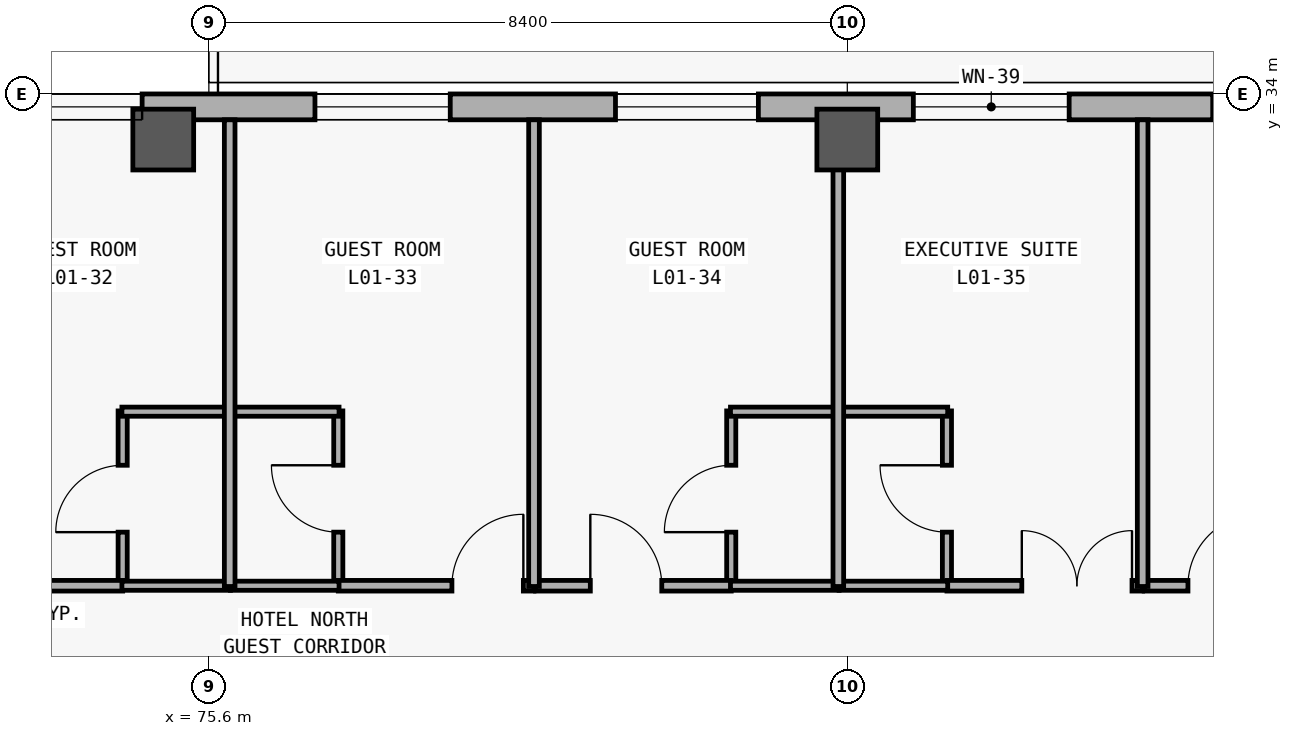
"""IFC4 building model, lengths in metres.
Left out: names, types, materials, properties, quantities, classifications, styles, units other than length and angle.
Written with IfcOpenShell. Run it as: python <this file> out.ifc"""

import sys

from ifc_helpers import new_model, si_unit, direction, frame, frame_2d, origin, origin_2d, place, context, subcontext, project, spatial, rectangle, extrude, element, fill, save


model = new_model("IFC4")
c1 = context("Model", 3, precision=1e-05, world=origin(), true_north=direction((0.0, 1.0)))
c2 = subcontext(c1, "Body", "Model", "MODEL_VIEW")
j1 = project(units=[si_unit("LENGTHUNIT", "METRE"), si_unit("PLANEANGLEUNIT", "RADIAN")], contexts=[c1])
p1 = place(None, origin())
s1 = spatial("IfcSite", under=j1, at=p1, CompositionType="ELEMENT")
p2 = place(p1, origin())
s2 = spatial("IfcBuilding", under=s1, at=p2, CompositionType="ELEMENT")
p3 = place(p2, frame((0.0, 0.0, 5.4)))
s3 = spatial("IfcBuildingStorey", under=s2, at=p3, CompositionType="ELEMENT", Elevation=5.4)
for number, where, z_axis, x_axis in (
    (1, (75.0, 33.4, 0.0), (0.0, 0.0, 1.0), (1.0, 0.0, 0.0)),
    (2, (84.0, 33.4, 0.0), (0.0, 0.0, 1.0), (1.0, 0.0, 0.0)),
):
    element("IfcColumn", number, at=place(p3, frame(where, z_axis=z_axis, x_axis=x_axis)), inside=s3, PredefinedType="COLUMN", context=c2, shape_type="SweptSolid", body=[
        extrude(rectangle(XDim=0.8, YDim=0.8, at=origin_2d()), origin(), (0.0, 0.0, 1.0), 5.4),
    ])
p4 = place(p3, frame((8.74, 33.83, 0.0), z_axis=(0.0, 0.0, 1.0), x_axis=(1.0, 0.0, 0.0)))
e3 = element("IfcWall", 3, at=p4, inside=s3, PredefinedType="SOLIDWALL", context=c2, shape_type="SweptSolid", body=[
    extrude(rectangle(XDim=83.32, YDim=0.34, at=frame_2d((41.66, 0.0))), origin(), (0.0, 0.0, 1.0), 5.1),
])
p5 = place(p4, frame((4.795, 0.0, 0.85)))
e4 = element("IfcOpeningElement", 4, at=p5, cuts=e3, PredefinedType="OPENING", context=c2, shape_type="SweptSolid", body=[
    extrude(rectangle(XDim=1.58, YDim=1.85, at=frame_2d((0.79, 0.925))), frame((0.0, 0.18, 0.0), z_axis=(0.0, -1.0, 0.0), x_axis=(1.0, 0.0, 0.0)), (0.0, 0.0, 1.0), 0.36),
])
p6 = place(p4, frame((11.542, 0.0, 0.85)))
e5 = element("IfcOpeningElement", 5, at=p6, cuts=e3, PredefinedType="OPENING", context=c2, shape_type="SweptSolid", body=[
    extrude(rectangle(XDim=3.1, YDim=2.2, at=frame_2d((1.55, 1.1))), frame((0.0, 0.18, 0.0), z_axis=(0.0, -1.0, 0.0), x_axis=(1.0, 0.0, 0.0)), (0.0, 0.0, 1.0), 0.36),
])
p7 = place(p4, frame((16.471, 0.0, 0.85)))
e6 = element("IfcOpeningElement", 6, at=p7, cuts=e3, PredefinedType="OPENING", context=c2, shape_type="SweptSolid", body=[
    extrude(rectangle(XDim=1.25, YDim=1.45, at=frame_2d((0.625, 0.725))), frame((0.0, 0.18, 0.0), z_axis=(0.0, -1.0, 0.0), x_axis=(1.0, 0.0, 0.0)), (0.0, 0.0, 1.0), 0.36),
])
p8 = place(p4, frame((20.425, 0.0, 0.85)))
e7 = element("IfcOpeningElement", 7, at=p8, cuts=e3, PredefinedType="OPENING", context=c2, shape_type="SweptSolid", body=[
    extrude(rectangle(XDim=1.35, YDim=1.55, at=frame_2d((0.675, 0.775))), frame((0.0, 0.18, 0.0), z_axis=(0.0, -1.0, 0.0), x_axis=(1.0, 0.0, 0.0)), (0.0, 0.0, 1.0), 0.36),
])
p9 = place(p4, frame((24.379, 0.0, 0.85)))
e8 = element("IfcOpeningElement", 8, at=p9, cuts=e3, PredefinedType="OPENING", context=c2, shape_type="SweptSolid", body=[
    extrude(rectangle(XDim=1.45, YDim=1.65, at=frame_2d((0.725, 0.825))), frame((0.0, 0.18, 0.0), z_axis=(0.0, -1.0, 0.0), x_axis=(1.0, 0.0, 0.0)), (0.0, 0.0, 1.0), 0.36),
])
p10 = place(p4, frame((28.332, 0.0, 0.85)))
e9 = element("IfcOpeningElement", 9, at=p10, cuts=e3, PredefinedType="OPENING", context=c2, shape_type="SweptSolid", body=[
    extrude(rectangle(XDim=1.55, YDim=1.65, at=frame_2d((0.775, 0.825))), frame((0.0, 0.18, 0.0), z_axis=(0.0, -1.0, 0.0), x_axis=(1.0, 0.0, 0.0)), (0.0, 0.0, 1.0), 0.36),
])
p11 = place(p4, frame((32.261, 0.0, 0.85)))
e10 = element("IfcOpeningElement", 10, at=p11, cuts=e3, PredefinedType="OPENING", context=c2, shape_type="SweptSolid", body=[
    extrude(rectangle(XDim=1.7, YDim=2.0, at=frame_2d((0.85, 1.0))), frame((0.0, 0.18, 0.0), z_axis=(0.0, -1.0, 0.0), x_axis=(1.0, 0.0, 0.0)), (0.0, 0.0, 1.0), 0.36),
])
p12 = place(p4, frame((35.965, 0.0, 0.85)))
e11 = element("IfcOpeningElement", 11, at=p12, cuts=e3, PredefinedType="OPENING", context=c2, shape_type="SweptSolid", body=[
    extrude(rectangle(XDim=2.3, YDim=2.05, at=frame_2d((1.15, 1.025))), frame((0.0, 0.18, 0.0), z_axis=(0.0, -1.0, 0.0), x_axis=(1.0, 0.0, 0.0)), (0.0, 0.0, 1.0), 0.36),
])
p13 = place(p4, frame((39.744, 0.0, 0.85)))
e12 = element("IfcOpeningElement", 12, at=p13, cuts=e3, PredefinedType="OPENING", context=c2, shape_type="SweptSolid", body=[
    extrude(rectangle(XDim=2.75, YDim=2.1, at=frame_2d((1.375, 1.05))), frame((0.0, 0.18, 0.0), z_axis=(0.0, -1.0, 0.0), x_axis=(1.0, 0.0, 0.0)), (0.0, 0.0, 1.0), 0.36),
])
p14 = place(p4, frame((44.533, 0.0, 0.85)))
e13 = element("IfcOpeningElement", 13, at=p14, cuts=e3, PredefinedType="OPENING", context=c2, shape_type="SweptSolid", body=[
    extrude(rectangle(XDim=1.18, YDim=1.5, at=frame_2d((0.59, 0.75))), frame((0.0, 0.18, 0.0), z_axis=(0.0, -1.0, 0.0), x_axis=(1.0, 0.0, 0.0)), (0.0, 0.0, 1.0), 0.36),
])
p15 = place(p4, frame((48.487, 0.0, 0.85)))
e14 = element("IfcOpeningElement", 14, at=p15, cuts=e3, PredefinedType="OPENING", context=c2, shape_type="SweptSolid", body=[
    extrude(rectangle(XDim=1.28, YDim=1.6, at=frame_2d((0.64, 0.8))), frame((0.0, 0.18, 0.0), z_axis=(0.0, -1.0, 0.0), x_axis=(1.0, 0.0, 0.0)), (0.0, 0.0, 1.0), 0.36),
])
p16 = place(p4, frame((52.441, 0.0, 0.85)))
e15 = element("IfcOpeningElement", 15, at=p16, cuts=e3, PredefinedType="OPENING", context=c2, shape_type="SweptSolid", body=[
    extrude(rectangle(XDim=1.38, YDim=1.7, at=frame_2d((0.69, 0.85))), frame((0.0, 0.18, 0.0), z_axis=(0.0, -1.0, 0.0), x_axis=(1.0, 0.0, 0.0)), (0.0, 0.0, 1.0), 0.36),
])
p17 = place(p4, frame((56.395, 0.0, 0.85)))
e16 = element("IfcOpeningElement", 16, at=p17, cuts=e3, PredefinedType="OPENING", context=c2, shape_type="SweptSolid", body=[
    extrude(rectangle(XDim=1.48, YDim=1.8, at=frame_2d((0.74, 0.9))), frame((0.0, 0.18, 0.0), z_axis=(0.0, -1.0, 0.0), x_axis=(1.0, 0.0, 0.0)), (0.0, 0.0, 1.0), 0.36),
])
p18 = place(p4, frame((60.349, 0.0, 0.85)))
e17 = element("IfcOpeningElement", 17, at=p18, cuts=e3, PredefinedType="OPENING", context=c2, shape_type="SweptSolid", body=[
    extrude(rectangle(XDim=1.58, YDim=1.85, at=frame_2d((0.79, 0.925))), frame((0.0, 0.18, 0.0), z_axis=(0.0, -1.0, 0.0), x_axis=(1.0, 0.0, 0.0)), (0.0, 0.0, 1.0), 0.36),
])
p19 = place(p4, frame((64.302, 0.0, 0.85)))
e18 = element("IfcOpeningElement", 18, at=p19, cuts=e3, PredefinedType="OPENING", context=c2, shape_type="SweptSolid", body=[
    extrude(rectangle(XDim=1.68, YDim=1.9, at=frame_2d((0.84, 0.95))), frame((0.0, 0.18, 0.0), z_axis=(0.0, -1.0, 0.0), x_axis=(1.0, 0.0, 0.0)), (0.0, 0.0, 1.0), 0.36),
])
p20 = place(p4, frame((68.256, 0.0, 0.85)))
e19 = element("IfcOpeningElement", 19, at=p20, cuts=e3, PredefinedType="OPENING", context=c2, shape_type="SweptSolid", body=[
    extrude(rectangle(XDim=1.78, YDim=1.95, at=frame_2d((0.89, 0.975))), frame((0.0, 0.18, 0.0), z_axis=(0.0, -1.0, 0.0), x_axis=(1.0, 0.0, 0.0)), (0.0, 0.0, 1.0), 0.36),
])
p21 = place(p4, frame((72.21, 0.0, 0.85)))
e20 = element("IfcOpeningElement", 20, at=p21, cuts=e3, PredefinedType="OPENING", context=c2, shape_type="SweptSolid", body=[
    extrude(rectangle(XDim=1.88, YDim=1.95, at=frame_2d((0.94, 0.975))), frame((0.0, 0.18, 0.0), z_axis=(0.0, -1.0, 0.0), x_axis=(1.0, 0.0, 0.0)), (0.0, 0.0, 1.0), 0.36),
])
p22 = place(p4, frame((76.129, 0.0, 0.85)))
e21 = element("IfcOpeningElement", 21, at=p22, cuts=e3, PredefinedType="OPENING", context=c2, shape_type="SweptSolid", body=[
    extrude(rectangle(XDim=2.05, YDim=1.95, at=frame_2d((1.025, 0.975))), frame((0.0, 0.18, 0.0), z_axis=(0.0, -1.0, 0.0), x_axis=(1.0, 0.0, 0.0)), (0.0, 0.0, 1.0), 0.36),
])
p23 = place(p4, frame((80.068, 0.0, 0.85)))
e22 = element("IfcOpeningElement", 22, at=p23, cuts=e3, PredefinedType="OPENING", context=c2, shape_type="SweptSolid", body=[
    extrude(rectangle(XDim=2.18, YDim=1.95, at=frame_2d((1.09, 0.975))), frame((0.0, 0.18, 0.0), z_axis=(0.0, -1.0, 0.0), x_axis=(1.0, 0.0, 0.0)), (0.0, 0.0, 1.0), 0.36),
])
p24 = place(p3, frame((74.466, 27.52, 0.0), z_axis=(0.0, 0.0, 1.0), x_axis=(0.0, 1.0, 0.0)))
e23 = element("IfcWall", 23, at=p24, inside=s3, PredefinedType="PARTITIONING", context=c2, shape_type="SweptSolid", body=[
    extrude(rectangle(XDim=2.31, YDim=0.12, at=frame_2d((1.155, 0.0))), origin(), (0.0, 0.0, 1.0), 4.18),
])
p25 = place(p24, frame((0.715, 0.0, 0.0)))
e24 = element("IfcOpeningElement", 24, at=p25, cuts=e23, PredefinedType="OPENING", context=c2, shape_type="SweptSolid", body=[
    extrude(rectangle(XDim=0.88, YDim=2.15, at=frame_2d((0.44, 1.075))), frame((0.0, 0.07, 0.0), z_axis=(0.0, -1.0, 0.0), x_axis=(1.0, 0.0, 0.0)), (0.0, 0.0, 1.0), 0.14),
])
p26 = place(p3, frame((77.303, 27.52, 0.0), z_axis=(0.0, 0.0, 1.0), x_axis=(0.0, 1.0, 0.0)))
e25 = element("IfcWall", 25, at=p26, inside=s3, PredefinedType="PARTITIONING", context=c2, shape_type="SweptSolid", body=[
    extrude(rectangle(XDim=2.31, YDim=0.12, at=frame_2d((1.155, 0.0))), origin(), (0.0, 0.0, 1.0), 4.18),
])
p27 = place(p26, frame((0.715, 0.0, 0.0)))
e26 = element("IfcOpeningElement", 26, at=p27, cuts=e25, PredefinedType="OPENING", context=c2, shape_type="SweptSolid", body=[
    extrude(rectangle(XDim=0.88, YDim=2.15, at=frame_2d((0.44, 1.075))), frame((0.0, 0.07, 0.0), z_axis=(0.0, -1.0, 0.0), x_axis=(1.0, 0.0, 0.0)), (0.0, 0.0, 1.0), 0.14),
])
p28 = place(p3, frame((82.473, 27.52, 0.0), z_axis=(0.0, 0.0, 1.0), x_axis=(0.0, 1.0, 0.0)))
e27 = element("IfcWall", 27, at=p28, inside=s3, PredefinedType="PARTITIONING", context=c2, shape_type="SweptSolid", body=[
    extrude(rectangle(XDim=2.31, YDim=0.12, at=frame_2d((1.155, 0.0))), origin(), (0.0, 0.0, 1.0), 4.18),
])
p29 = place(p28, frame((0.715, 0.0, 0.0)))
e28 = element("IfcOpeningElement", 28, at=p29, cuts=e27, PredefinedType="OPENING", context=c2, shape_type="SweptSolid", body=[
    extrude(rectangle(XDim=0.88, YDim=2.15, at=frame_2d((0.44, 1.075))), frame((0.0, 0.07, 0.0), z_axis=(0.0, -1.0, 0.0), x_axis=(1.0, 0.0, 0.0)), (0.0, 0.0, 1.0), 0.14),
])
p30 = place(p3, frame((85.311, 27.52, 0.0), z_axis=(0.0, 0.0, 1.0), x_axis=(0.0, 1.0, 0.0)))
e29 = element("IfcWall", 29, at=p30, inside=s3, PredefinedType="PARTITIONING", context=c2, shape_type="SweptSolid", body=[
    extrude(rectangle(XDim=2.31, YDim=0.12, at=frame_2d((1.155, 0.0))), origin(), (0.0, 0.0, 1.0), 4.18),
])
p31 = place(p30, frame((0.715, 0.0, 0.0)))
e30 = element("IfcOpeningElement", 30, at=p31, cuts=e29, PredefinedType="OPENING", context=c2, shape_type="SweptSolid", body=[
    extrude(rectangle(XDim=0.88, YDim=2.15, at=frame_2d((0.44, 1.075))), frame((0.0, 0.07, 0.0), z_axis=(0.0, -1.0, 0.0), x_axis=(1.0, 0.0, 0.0)), (0.0, 0.0, 1.0), 0.14),
])
p32 = place(p3, frame((71.891, 27.53, 0.0), z_axis=(0.0, 0.0, 1.0), x_axis=(1.0, 0.0, 0.0)))
e31 = element("IfcWall", 31, at=p32, inside=s3, PredefinedType="PARTITIONING", context=c2, shape_type="SweptSolid", body=[
    extrude(rectangle(XDim=2.575, YDim=0.14, at=frame_2d((1.288, 0.0))), origin(), (0.0, 0.0, 1.0), 4.18),
])
p33 = place(p32, frame((0.576, 0.0, 0.0)))
e32 = element("IfcOpeningElement", 32, at=p33, cuts=e31, PredefinedType="OPENING", context=c2, shape_type="SweptSolid", body=[
    extrude(rectangle(XDim=0.94, YDim=2.2, at=frame_2d((0.47, 1.1))), frame((0.0, 0.08, 0.0), z_axis=(0.0, -1.0, 0.0), x_axis=(1.0, 0.0, 0.0)), (0.0, 0.0, 1.0), 0.16),
])
p34 = place(p3, frame((77.303, 27.53, 0.0), z_axis=(0.0, 0.0, 1.0), x_axis=(1.0, 0.0, 0.0)))
e33 = element("IfcWall", 33, at=p34, inside=s3, PredefinedType="PARTITIONING", context=c2, shape_type="SweptSolid", body=[
    extrude(rectangle(XDim=2.575, YDim=0.14, at=frame_2d((1.288, 0.0))), origin(), (0.0, 0.0, 1.0), 4.18),
])
p35 = place(p34, frame((1.495, 0.0, 0.0)))
e34 = element("IfcOpeningElement", 34, at=p35, cuts=e33, PredefinedType="OPENING", context=c2, shape_type="SweptSolid", body=[
    extrude(rectangle(XDim=0.94, YDim=2.2, at=frame_2d((0.47, 1.1))), frame((0.0, 0.08, 0.0), z_axis=(0.0, -1.0, 0.0), x_axis=(1.0, 0.0, 0.0)), (0.0, 0.0, 1.0), 0.16),
])
p36 = place(p3, frame((79.898, 27.53, 0.0), z_axis=(0.0, 0.0, 1.0), x_axis=(1.0, 0.0, 0.0)))
e35 = element("IfcWall", 35, at=p36, inside=s3, PredefinedType="PARTITIONING", context=c2, shape_type="SweptSolid", body=[
    extrude(rectangle(XDim=2.575, YDim=0.14, at=frame_2d((1.288, 0.0))), origin(), (0.0, 0.0, 1.0), 4.18),
])
p37 = place(p36, frame((0.721, 0.0, 0.0)))
e36 = element("IfcOpeningElement", 36, at=p37, cuts=e35, PredefinedType="OPENING", context=c2, shape_type="SweptSolid", body=[
    extrude(rectangle(XDim=0.94, YDim=2.2, at=frame_2d((0.47, 1.1))), frame((0.0, 0.08, 0.0), z_axis=(0.0, -1.0, 0.0), x_axis=(1.0, 0.0, 0.0)), (0.0, 0.0, 1.0), 0.16),
])
p38 = place(p3, frame((85.311, 27.53, 0.0), z_axis=(0.0, 0.0, 1.0), x_axis=(1.0, 0.0, 0.0)))
e37 = element("IfcWall", 37, at=p38, inside=s3, PredefinedType="PARTITIONING", context=c2, shape_type="SweptSolid", body=[
    extrude(rectangle(XDim=2.575, YDim=0.14, at=frame_2d((1.288, 0.0))), origin(), (0.0, 0.0, 1.0), 4.18),
])
p39 = place(p38, frame((0.985, 0.0, 0.0)))
e38 = element("IfcOpeningElement", 38, at=p39, cuts=e37, PredefinedType="OPENING", context=c2, shape_type="SweptSolid", body=[
    extrude(rectangle(XDim=1.45, YDim=2.3, at=frame_2d((0.725, 1.15))), frame((0.0, 0.08, 0.0), z_axis=(0.0, -1.0, 0.0), x_axis=(1.0, 0.0, 0.0)), (0.0, 0.0, 1.0), 0.16),
])
p40 = place(p3, frame((87.906, 27.53, 0.0), z_axis=(0.0, 0.0, 1.0), x_axis=(1.0, 0.0, 0.0)))
e39 = element("IfcWall", 39, at=p40, inside=s3, PredefinedType="PARTITIONING", context=c2, shape_type="SweptSolid", body=[
    extrude(rectangle(XDim=2.575, YDim=0.14, at=frame_2d((1.288, 0.0))), origin(), (0.0, 0.0, 1.0), 4.18),
])
p41 = place(p40, frame((0.576, 0.0, 0.0)))
e40 = element("IfcOpeningElement", 40, at=p41, cuts=e39, PredefinedType="OPENING", context=c2, shape_type="SweptSolid", body=[
    extrude(rectangle(XDim=0.94, YDim=2.2, at=frame_2d((0.47, 1.1))), frame((0.0, 0.08, 0.0), z_axis=(0.0, -1.0, 0.0), x_axis=(1.0, 0.0, 0.0)), (0.0, 0.0, 1.0), 0.16),
])
for number, where, z_axis, x_axis in (
    (41, (74.456, 27.53, 0.0), (0.0, 0.0, 1.0), (1.0, 0.0, 0.0)),
    (42, (74.456, 29.82, 0.0), (0.0, 0.0, 1.0), (1.0, 0.0, 0.0)),
):
    element("IfcWall", number, at=place(p3, frame(where, z_axis=z_axis, x_axis=x_axis)), inside=s3, PredefinedType="PARTITIONING", context=c2, shape_type="SweptSolid", body=[
        extrude(rectangle(XDim=1.428, YDim=0.12, at=frame_2d((0.714, 0.0))), origin(), (0.0, 0.0, 1.0), 4.18),
    ])
for number, where, z_axis, x_axis in (
    (43, (75.884, 27.53, 0.0), (0.0, 0.0, 1.0), (1.0, 0.0, 0.0)),
    (44, (75.884, 29.82, 0.0), (0.0, 0.0, 1.0), (1.0, 0.0, 0.0)),
):
    element("IfcWall", number, at=place(p3, frame(where, z_axis=z_axis, x_axis=x_axis)), inside=s3, PredefinedType="PARTITIONING", context=c2, shape_type="SweptSolid", body=[
        extrude(rectangle(XDim=1.429, YDim=0.12, at=frame_2d((0.714, 0.0))), origin(), (0.0, 0.0, 1.0), 4.18),
    ])
for number, where, z_axis, x_axis in (
    (45, (82.463, 27.53, 0.0), (0.0, 0.0, 1.0), (1.0, 0.0, 0.0)),
    (46, (82.463, 29.82, 0.0), (0.0, 0.0, 1.0), (1.0, 0.0, 0.0)),
):
    element("IfcWall", number, at=place(p3, frame(where, z_axis=z_axis, x_axis=x_axis)), inside=s3, PredefinedType="PARTITIONING", context=c2, shape_type="SweptSolid", body=[
        extrude(rectangle(XDim=1.429, YDim=0.12, at=frame_2d((0.715, 0.0))), origin(), (0.0, 0.0, 1.0), 4.18),
    ])
for number, where, z_axis, x_axis in (
    (47, (83.892, 27.53, 0.0), (0.0, 0.0, 1.0), (1.0, 0.0, 0.0)),
    (48, (83.892, 29.82, 0.0), (0.0, 0.0, 1.0), (1.0, 0.0, 0.0)),
):
    element("IfcWall", number, at=place(p3, frame(where, z_axis=z_axis, x_axis=x_axis)), inside=s3, PredefinedType="PARTITIONING", context=c2, shape_type="SweptSolid", body=[
        extrude(rectangle(XDim=1.429, YDim=0.12, at=frame_2d((0.714, 0.0))), origin(), (0.0, 0.0, 1.0), 4.18),
    ])
for number, where, z_axis, x_axis in (
    (49, (75.874, 27.52, 0.0), (0.0, 0.0, 1.0), (0.0, 1.0, 0.0)),
    (50, (79.878, 27.52, 0.0), (0.0, 0.0, 1.0), (0.0, 1.0, 0.0)),
    (51, (83.882, 27.52, 0.0), (0.0, 0.0, 1.0), (0.0, 1.0, 0.0)),
    (52, (87.886, 27.52, 0.0), (0.0, 0.0, 1.0), (0.0, 1.0, 0.0)),
):
    element("IfcWall", number, at=place(p3, frame(where, z_axis=z_axis, x_axis=x_axis)), inside=s3, PredefinedType="PARTITIONING", context=c2, shape_type="SweptSolid", body=[
        extrude(rectangle(XDim=6.14, YDim=0.14, at=frame_2d((3.07, 0.0))), origin(), (0.0, 0.0, 1.0), 4.18),
    ])
p42 = place(p19, origin())
e53 = element("IfcWindow", 53, at=p42, inside=s3, PartitioningType="SINGLE_PANEL", PredefinedType="WINDOW", context=c2, shape_type="SweptSolid", body=[
    extrude(rectangle(XDim=1.68, YDim=1.9, at=frame_2d((0.84, 0.95))), frame((0.0, 0.03, 0.0), z_axis=(0.0, -1.0, 0.0), x_axis=(1.0, 0.0, 0.0)), (0.0, 0.0, 1.0), 0.06),
])
fill(e18, e53)
p43 = place(p20, origin())
e54 = element("IfcWindow", 54, at=p43, inside=s3, PartitioningType="SINGLE_PANEL", PredefinedType="WINDOW", context=c2, shape_type="SweptSolid", body=[
    extrude(rectangle(XDim=1.78, YDim=1.95, at=frame_2d((0.89, 0.975))), frame((0.0, 0.03, 0.0), z_axis=(0.0, -1.0, 0.0), x_axis=(1.0, 0.0, 0.0)), (0.0, 0.0, 1.0), 0.06),
])
fill(e19, e54)
p44 = place(p21, origin())
e55 = element("IfcWindow", 55, at=p44, inside=s3, PartitioningType="SINGLE_PANEL", PredefinedType="WINDOW", context=c2, shape_type="SweptSolid", body=[
    extrude(rectangle(XDim=1.88, YDim=1.95, at=frame_2d((0.94, 0.975))), frame((0.0, 0.03, 0.0), z_axis=(0.0, -1.0, 0.0), x_axis=(1.0, 0.0, 0.0)), (0.0, 0.0, 1.0), 0.06),
])
fill(e20, e55)
p45 = place(p22, origin())
e56 = element("IfcWindow", 56, at=p45, inside=s3, PartitioningType="SINGLE_PANEL", PredefinedType="WINDOW", context=c2, shape_type="SweptSolid", body=[
    extrude(rectangle(XDim=2.05, YDim=1.95, at=frame_2d((1.025, 0.975))), frame((0.0, 0.03, 0.0), z_axis=(0.0, -1.0, 0.0), x_axis=(1.0, 0.0, 0.0)), (0.0, 0.0, 1.0), 0.06),
])
fill(e21, e56)
p46 = place(p23, origin())
e57 = element("IfcWindow", 57, at=p46, inside=s3, PartitioningType="SINGLE_PANEL", PredefinedType="WINDOW", context=c2, shape_type="SweptSolid", body=[
    extrude(rectangle(XDim=2.18, YDim=1.95, at=frame_2d((1.09, 0.975))), frame((0.0, 0.03, 0.0), z_axis=(0.0, -1.0, 0.0), x_axis=(1.0, 0.0, 0.0)), (0.0, 0.0, 1.0), 0.06),
])
fill(e22, e57)
p47 = place(p25, origin())
e58 = element("IfcDoor", 58, at=p47, inside=s3, OperationType="SINGLE_SWING_LEFT", PredefinedType="DOOR", context=c2, shape_type="SweptSolid", body=[
    extrude(rectangle(XDim=0.88, YDim=2.15, at=frame_2d((0.44, 1.075))), frame((0.0, 0.025, 0.0), z_axis=(0.0, -1.0, 0.0), x_axis=(1.0, 0.0, 0.0)), (0.0, 0.0, 1.0), 0.05),
])
fill(e24, e58)
p48 = place(p27, origin())
e59 = element("IfcDoor", 59, at=p48, inside=s3, OperationType="SINGLE_SWING_RIGHT", PredefinedType="DOOR", context=c2, shape_type="SweptSolid", body=[
    extrude(rectangle(XDim=0.88, YDim=2.15, at=frame_2d((0.44, 1.075))), frame((0.0, 0.025, 0.0), z_axis=(0.0, -1.0, 0.0), x_axis=(1.0, 0.0, 0.0)), (0.0, 0.0, 1.0), 0.05),
])
fill(e26, e59)
p49 = place(p29, origin())
e60 = element("IfcDoor", 60, at=p49, inside=s3, OperationType="SINGLE_SWING_LEFT", PredefinedType="DOOR", context=c2, shape_type="SweptSolid", body=[
    extrude(rectangle(XDim=0.88, YDim=2.15, at=frame_2d((0.44, 1.075))), frame((0.0, 0.025, 0.0), z_axis=(0.0, -1.0, 0.0), x_axis=(1.0, 0.0, 0.0)), (0.0, 0.0, 1.0), 0.05),
])
fill(e28, e60)
p50 = place(p31, origin())
e61 = element("IfcDoor", 61, at=p50, inside=s3, OperationType="SINGLE_SWING_RIGHT", PredefinedType="DOOR", context=c2, shape_type="SweptSolid", body=[
    extrude(rectangle(XDim=0.88, YDim=2.15, at=frame_2d((0.44, 1.075))), frame((0.0, 0.025, 0.0), z_axis=(0.0, -1.0, 0.0), x_axis=(1.0, 0.0, 0.0)), (0.0, 0.0, 1.0), 0.05),
])
fill(e30, e61)
p51 = place(p35, origin())
e62 = element("IfcDoor", 62, at=p51, inside=s3, OperationType="SINGLE_SWING_RIGHT", PredefinedType="DOOR", context=c2, shape_type="SweptSolid", body=[
    extrude(rectangle(XDim=0.94, YDim=2.2, at=frame_2d((0.47, 1.1))), frame((0.0, 0.025, 0.0), z_axis=(0.0, -1.0, 0.0), x_axis=(1.0, 0.0, 0.0)), (0.0, 0.0, 1.0), 0.05),
])
fill(e34, e62)
p52 = place(p37, origin())
e63 = element("IfcDoor", 63, at=p52, inside=s3, OperationType="SINGLE_SWING_LEFT", PredefinedType="DOOR", context=c2, shape_type="SweptSolid", body=[
    extrude(rectangle(XDim=0.94, YDim=2.2, at=frame_2d((0.47, 1.1))), frame((0.0, 0.025, 0.0), z_axis=(0.0, -1.0, 0.0), x_axis=(1.0, 0.0, 0.0)), (0.0, 0.0, 1.0), 0.05),
])
fill(e36, e63)
p53 = place(p39, origin())
e64 = element("IfcDoor", 64, at=p53, inside=s3, OperationType="DOUBLE_DOOR_SINGLE_SWING", PredefinedType="DOOR", context=c2, shape_type="SweptSolid", body=[
    extrude(rectangle(XDim=1.45, YDim=2.3, at=frame_2d((0.725, 1.15))), frame((0.0, 0.025, 0.0), z_axis=(0.0, -1.0, 0.0), x_axis=(1.0, 0.0, 0.0)), (0.0, 0.0, 1.0), 0.05),
])
fill(e38, e64)
p54 = place(p41, origin())
e65 = element("IfcDoor", 65, at=p54, inside=s3, OperationType="SINGLE_SWING_RIGHT", PredefinedType="DOOR", context=c2, shape_type="SweptSolid", body=[
    extrude(rectangle(XDim=0.94, YDim=2.2, at=frame_2d((0.47, 1.1))), frame((0.0, 0.025, 0.0), z_axis=(0.0, -1.0, 0.0), x_axis=(1.0, 0.0, 0.0)), (0.0, 0.0, 1.0), 0.05),
])
fill(e40, e65)
save(model, sys.argv[1])
